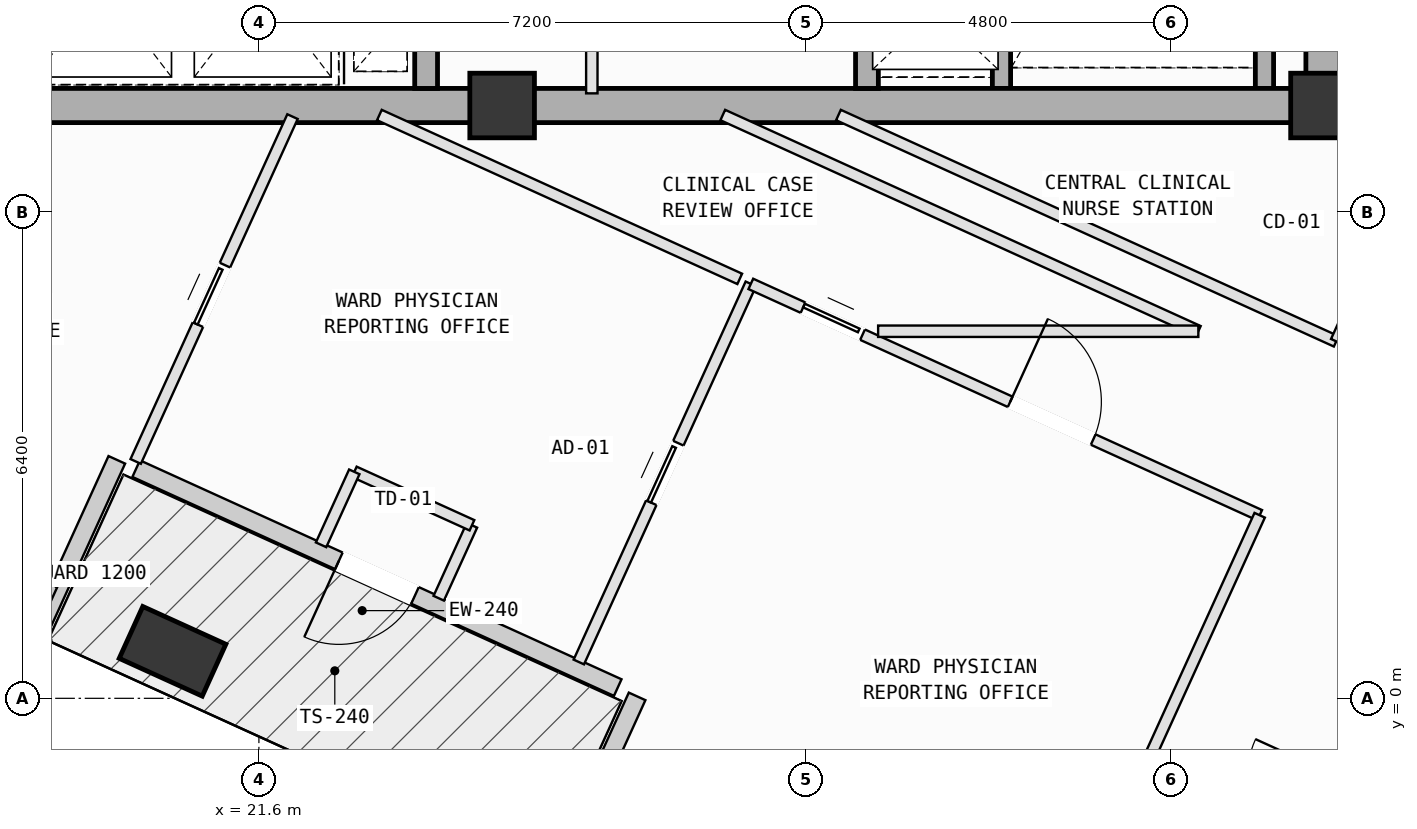
"""IFC4 building model, lengths in metres.
Left out: names, types, materials, properties, quantities, classifications, styles, units other than length and angle.
Written with IfcOpenShell. Run it as: python <this file> out.ifc"""

import sys

from ifc_helpers import new_model, si_unit, direction, frame, frame_2d, origin, origin_2d, place, context, subcontext, project, spatial, rectangle, extrude, element, fill, save


model = new_model("IFC4")
c1 = context("Model", 3, precision=1e-05, world=origin(), true_north=direction((0.0, 1.0)))
c2 = subcontext(c1, "Body", "Model", "MODEL_VIEW")
j1 = project(units=[si_unit("LENGTHUNIT", "METRE"), si_unit("PLANEANGLEUNIT", "RADIAN")], contexts=[c1])
p1 = place(None, origin())
s1 = spatial("IfcSite", under=j1, at=p1, CompositionType="ELEMENT")
p2 = place(p1, origin())
s2 = spatial("IfcBuilding", under=s1, at=p2, CompositionType="ELEMENT")
p3 = place(p2, frame((0.0, 0.0, 304.6)))
s3 = spatial("IfcBuildingStorey", under=s2, at=p3, CompositionType="ELEMENT", Elevation=304.6)
for number, where, z_axis, x_axis in (
    (1, (24.8, 7.8, 0.0), (0.0, 0.0, 1.0), (1.0, 0.0, 0.0)),
    (2, (35.6, 7.8, 0.0), (0.0, 0.0, 1.0), (1.0, 0.0, 0.0)),
):
    element("IfcColumn", number, at=place(p3, frame(where, z_axis=z_axis, x_axis=x_axis)), inside=s3, PredefinedType="COLUMN", context=c2, shape_type="SweptSolid", body=[
        extrude(rectangle(XDim=0.85, YDim=0.85, at=origin_2d()), origin(), (0.0, 0.0, 1.0), 4.0),
    ])
p4 = place(p3, frame((20.464, 0.619, 0.002), z_axis=(0.100016423417, -0.053280353956, 0.993558211143), x_axis=(-0.790946445889, -0.61008500416, 0.046904236858)))
e3 = element("IfcColumn", 3, at=p4, inside=s3, PredefinedType="COLUMN", context=c2, shape_type="SweptSolid", body=[
    extrude(rectangle(XDim=1.2, YDim=0.75, at=origin_2d()), origin(), (0.0, 0.0, 1.0), 3.954),
])
p5 = place(p3, frame((26.321, 0.141, 0.0), z_axis=(0.0, 0.0, 1.0), x_axis=(-0.910318420634, 0.413908653032, 0.0)))
e4 = element("IfcWall", 4, at=p5, inside=s3, PredefinedType="SOLIDWALL", context=c2, shape_type="SweptSolid", body=[
    extrude(rectangle(XDim=6.96, YDim=0.24, at=frame_2d((3.48, 0.0))), origin(), (0.0, 0.0, 1.0), 3.265),
])
p6 = place(p5, frame((2.93, 0.0, 0.0)))
e5 = element("IfcOpeningElement", 5, at=p6, cuts=e4, PredefinedType="OPENING", context=c2, shape_type="SweptSolid", body=[
    extrude(rectangle(XDim=1.1, YDim=2.15, at=frame_2d((0.55, 1.075))), frame((0.0, 0.13, 0.0), z_axis=(0.0, -1.0, 0.0), x_axis=(1.0, 0.0, 0.0)), (0.0, 0.0, 1.0), 0.26),
])
p7 = place(p3, frame((25.541, -2.25, 0.0), z_axis=(0.0, 0.0, 1.0), x_axis=(0.413898598891, 0.91032299204, 0.0)))
e6 = element("IfcWall", 6, at=p7, inside=s3, PredefinedType="SOLIDWALL", context=c2, shape_type="SweptSolid", body=[
    extrude(rectangle(XDim=2.5, YDim=0.24, at=frame_2d((1.25, 0.0))), origin(), (0.0, 0.0, 1.0), 3.265),
])
p8 = place(p3, frame((19.73, 3.138, 0.0), z_axis=(0.0, 0.0, 1.0), x_axis=(-0.413942727545, -0.910302926675, 0.0)))
e7 = element("IfcWall", 7, at=p8, inside=s3, PredefinedType="SOLIDWALL", context=c2, shape_type="SweptSolid", body=[
    extrude(rectangle(XDim=2.5, YDim=0.24, at=frame_2d((1.25, 0.0))), origin(), (0.0, 0.0, 1.0), 3.265),
])
p9 = place(p3, frame((18.888, 1.335, 0.0), z_axis=(0.0, 0.0, 1.0), x_axis=(-0.910315921542, 0.413914149296, 0.0)))
e8 = element("IfcWall", 8, at=p9, inside=s3, PredefinedType="SOLIDWALL", context=c2, shape_type="SweptSolid", body=[
    extrude(rectangle(XDim=4.301, YDim=0.28, at=frame_2d((2.15, 0.0))), origin(), (0.0, 0.0, 1.0), 3.245),
])
p10 = place(p9, frame((1.374, 0.0, 0.75)))
e9 = element("IfcOpeningElement", 9, at=p10, cuts=e8, PredefinedType="OPENING", context=c2, shape_type="SweptSolid", body=[
    extrude(rectangle(XDim=1.4, YDim=1.85, at=frame_2d((0.7, 0.925))), frame((0.0, 0.15, 0.0), z_axis=(0.0, -1.0, 0.0), x_axis=(1.0, 0.0, 0.0)), (0.0, 0.0, 1.0), 0.3),
])
for number, where, z_axis, x_axis in (
    (10, (34.83, 15.12, 0.0), (0.0, 0.0, 1.0), (0.0, -1.0, 0.0)),
    (11, (31.37, 8.025, 0.0), (0.0, 0.0, 1.0), (0.0, 1.0, 0.0)),
):
    element("IfcWall", number, at=place(p3, frame(where, z_axis=z_axis, x_axis=x_axis)), inside=s3, PredefinedType="SOLIDWALL", context=c2, shape_type="SweptSolid", body=[
        extrude(rectangle(XDim=7.095, YDim=0.24, at=frame_2d((3.548, 0.0))), origin(), (0.0, 0.0, 1.0), 3.78),
    ])
for number, where, z_axis, x_axis in (
    (12, (14.0, 7.8, 0.0), (0.0, 0.0, 1.0), (1.0, 0.0, 0.0)),
    (13, (24.8, 7.8, 0.0), (0.0, 0.0, 1.0), (1.0, 0.0, 0.0)),
):
    element("IfcWall", number, at=place(p3, frame(where, z_axis=z_axis, x_axis=x_axis)), inside=s3, PredefinedType="SHEAR", context=c2, shape_type="SweptSolid", body=[
        extrude(rectangle(XDim=10.8, YDim=0.45, at=frame_2d((5.4, 0.0))), origin(), (0.0, 0.0, 1.0), 3.78),
    ])
p11 = place(p3, frame((35.6, 7.8, 0.0), z_axis=(0.0, 0.0, 1.0), x_axis=(0.0, 1.0, 0.0)))
e14 = element("IfcWall", 14, at=p11, inside=s3, PredefinedType="SHEAR", context=c2, shape_type="SweptSolid", body=[
    extrude(rectangle(XDim=9.0, YDim=0.45, at=frame_2d((4.5, 0.0))), origin(), (0.0, 0.0, 1.0), 3.78),
])
p12 = place(p3, frame((23.8, 8.025, 0.0), z_axis=(0.0, 0.0, 1.0), x_axis=(0.0, 1.0, 0.0)))
e15 = element("IfcWall", 15, at=p12, inside=s3, PredefinedType="SOLIDWALL", context=c2, shape_type="SweptSolid", body=[
    extrude(rectangle(XDim=2.655, YDim=0.3, at=frame_2d((1.328, 0.0))), origin(), (0.0, 0.0, 1.0), 3.78),
])
p13 = place(p3, frame((29.6, 8.025, 0.0), z_axis=(0.0, 0.0, 1.0), x_axis=(0.0, 1.0, 0.0)))
e16 = element("IfcWall", 16, at=p13, inside=s3, PredefinedType="SOLIDWALL", context=c2, shape_type="SweptSolid", body=[
    extrude(rectangle(XDim=1.995, YDim=0.3, at=frame_2d((0.998, 0.0))), origin(), (0.0, 0.0, 1.0), 3.78),
])
p14 = place(p3, frame((25.98, 7.96, 0.0), z_axis=(0.0, 0.0, 1.0), x_axis=(0.0, 1.0, 0.0)))
e17 = element("IfcWall", 17, at=p14, inside=s3, PredefinedType="PARTITIONING", context=c2, shape_type="SweptSolid", body=[
    extrude(rectangle(XDim=2.54, YDim=0.15, at=frame_2d((1.27, 0.0))), origin(), (0.0, 0.0, 1.0), 3.78),
])
p15 = place(p14, frame((0.945, 0.0, 0.0)))
e18 = element("IfcOpeningElement", 18, at=p15, cuts=e17, PredefinedType="OPENING", context=c2, shape_type="SweptSolid", body=[
    extrude(rectangle(XDim=1.0, YDim=2.12, at=frame_2d((0.5, 1.06))), frame((0.0, 0.085, 0.0), z_axis=(0.0, -1.0, 0.0), x_axis=(1.0, 0.0, 0.0)), (0.0, 0.0, 1.0), 0.17),
])
p16 = place(p3, frame((33.851, -5.331, 0.0), z_axis=(0.0, 0.0, 1.0), x_axis=(0.413939108793, 0.910304572224, 0.0)))
e19 = element("IfcWall", 19, at=p16, inside=s3, PredefinedType="PARTITIONING", context=c2, shape_type="SweptSolid", body=[
    extrude(rectangle(XDim=8.24, YDim=0.15, at=frame_2d((4.12, 0.0))), origin(), (0.0, 0.0, 1.0), 3.78),
])
p17 = place(p16, frame((3.52, 0.0, 0.0)))
e20 = element("IfcOpeningElement", 20, at=p17, cuts=e19, PredefinedType="OPENING", context=c2, shape_type="SweptSolid", body=[
    extrude(rectangle(XDim=1.2, YDim=2.15, at=frame_2d((0.6, 1.075))), frame((0.0, 0.085, 0.0), z_axis=(0.0, -1.0, 0.0), x_axis=(1.0, 0.0, 0.0)), (0.0, 0.0, 1.0), 0.17),
])
p18 = place(p3, frame((25.809, 0.478, 0.0), z_axis=(0.0, 0.0, 1.0), x_axis=(0.414051982824, 0.910253237028, 0.0)))
e21 = element("IfcWall", 21, at=p18, inside=s3, PredefinedType="PARTITIONING", context=c2, shape_type="SweptSolid", body=[
    extrude(rectangle(XDim=5.465, YDim=0.15, at=frame_2d((2.733, 0.0))), origin(), (0.0, 0.0, 1.0), 3.78),
])
p19 = place(p18, frame((2.303, 0.0, 0.0)))
e22 = element("IfcOpeningElement", 22, at=p19, cuts=e21, PredefinedType="OPENING", context=c2, shape_type="SweptSolid", body=[
    extrude(rectangle(XDim=0.86, YDim=2.06, at=frame_2d((0.43, 1.03))), frame((0.0, 0.085, 0.0), z_axis=(0.0, -1.0, 0.0), x_axis=(1.0, 0.0, 0.0)), (0.0, 0.0, 1.0), 0.17),
])
p20 = place(p3, frame((28.072, 5.453, 0.0), z_axis=(0.0, 0.0, 1.0), x_axis=(0.910328957898, -0.413885477412, 0.0)))
e23 = element("IfcWall", 23, at=p20, inside=s3, PredefinedType="PARTITIONING", context=c2, shape_type="SweptSolid", body=[
    extrude(rectangle(XDim=7.354, YDim=0.15, at=frame_2d((3.677, 0.0))), origin(), (0.0, 0.0, 1.0), 3.78),
])
p21 = place(p20, frame((3.749, 0.0, 0.0)))
e24 = element("IfcOpeningElement", 24, at=p21, cuts=e23, PredefinedType="OPENING", context=c2, shape_type="SweptSolid", body=[
    extrude(rectangle(XDim=1.2, YDim=2.15, at=frame_2d((0.6, 1.075))), frame((0.0, 0.085, 0.0), z_axis=(0.0, -1.0, 0.0), x_axis=(1.0, 0.0, 0.0)), (0.0, 0.0, 1.0), 0.17),
])
p22 = place(p20, frame((0.755, 0.0, 0.0)))
e25 = element("IfcOpeningElement", 25, at=p22, cuts=e23, PredefinedType="OPENING", context=c2, shape_type="SweptSolid", body=[
    extrude(rectangle(XDim=0.86, YDim=2.06, at=frame_2d((0.43, 1.03))), frame((0.0, 0.085, 0.0), z_axis=(0.0, -1.0, 0.0), x_axis=(1.0, 0.0, 0.0)), (0.0, 0.0, 1.0), 0.17),
])
p23 = place(p3, frame((34.767, 2.409, 0.0), z_axis=(0.0, 0.0, 1.0), x_axis=(-0.413855914094, -0.910342398425, 0.0)))
e26 = element("IfcWall", 26, at=p23, inside=s3, PredefinedType="PARTITIONING", context=c2, shape_type="SweptSolid", body=[
    extrude(rectangle(XDim=5.903, YDim=0.15, at=frame_2d((2.952, 0.0))), origin(), (0.0, 0.0, 1.0), 3.78),
])
p24 = place(p3, frame((23.966, 1.317, 0.0), z_axis=(0.0, 0.0, 1.0), x_axis=(0.414238787533, 0.910168240988, 0.0)))
e27 = element("IfcWall", 27, at=p24, inside=s3, PredefinedType="PARTITIONING", context=c2, shape_type="SweptSolid", body=[
    extrude(rectangle(XDim=1.055, YDim=0.15, at=frame_2d((0.527, 0.0))), origin(), (0.0, 0.0, 1.0), 3.78),
])
p25 = place(p3, frame((24.403, 2.277, 0.0), z_axis=(0.0, 0.0, 1.0), x_axis=(-0.910543430544, 0.413413426358, 0.0)))
e28 = element("IfcWall", 28, at=p25, inside=s3, PredefinedType="PARTITIONING", context=c2, shape_type="SweptSolid", body=[
    extrude(rectangle(XDim=1.7, YDim=0.15, at=frame_2d((0.85, 0.0))), origin(), (0.0, 0.0, 1.0), 3.78),
])
p26 = place(p3, frame((22.855, 2.98, 0.0), z_axis=(0.0, 0.0, 1.0), x_axis=(-0.414326054961, -0.910128518496, 0.0)))
e29 = element("IfcWall", 29, at=p26, inside=s3, PredefinedType="PARTITIONING", context=c2, shape_type="SweptSolid", body=[
    extrude(rectangle(XDim=1.055, YDim=0.15, at=frame_2d((0.527, 0.0))), origin(), (0.0, 0.0, 1.0), 3.78),
])
p27 = place(p3, frame((19.979, 3.117, 0.0), z_axis=(0.0, 0.0, 1.0), x_axis=(0.413913658196, 0.910316144841, 0.0)))
e30 = element("IfcWall", 30, at=p27, inside=s3, PredefinedType="PARTITIONING", context=c2, shape_type="SweptSolid", body=[
    extrude(rectangle(XDim=4.984, YDim=0.15, at=frame_2d((2.492, 0.0))), origin(), (0.0, 0.0, 1.0), 3.78),
])
p28 = place(p27, frame((1.977, 0.0, 0.0)))
e31 = element("IfcOpeningElement", 31, at=p28, cuts=e30, PredefinedType="OPENING", context=c2, shape_type="SweptSolid", body=[
    extrude(rectangle(XDim=0.86, YDim=2.06, at=frame_2d((0.43, 1.03))), frame((0.0, 0.085, 0.0), z_axis=(0.0, -1.0, 0.0), x_axis=(1.0, 0.0, 0.0)), (0.0, 0.0, 1.0), 0.17),
])
p29 = place(p3, frame((23.185, 7.675, 0.0), z_axis=(0.0, 0.0, 1.0), x_axis=(0.910292616599, -0.413965399721, 0.0)))
e32 = element("IfcWall", 32, at=p29, inside=s3, PredefinedType="PARTITIONING", context=c2, shape_type="SweptSolid", body=[
    extrude(rectangle(XDim=5.208, YDim=0.15, at=frame_2d((2.604, 0.0))), origin(), (0.0, 0.0, 1.0), 3.78),
])
p30 = place(p3, frame((35.774, 4.697, 0.0), z_axis=(0.0, 0.0, 1.0), x_axis=(-0.910299058276, 0.413951234449, 0.0)))
e33 = element("IfcWall", 33, at=p30, inside=s3, PredefinedType="PARTITIONING", context=c2, shape_type="SweptSolid", body=[
    extrude(rectangle(XDim=7.194, YDim=0.15, at=frame_2d((3.597, 0.0))), origin(), (0.0, 0.0, 1.0), 3.78),
])
p31 = place(p3, frame((35.6, 7.5, 0.0), z_axis=(0.0, 0.0, 1.0), x_axis=(1.0, 0.0, 0.0)))
e34 = element("IfcWall", 34, at=p31, inside=s3, PredefinedType="PARTITIONING", context=c2, shape_type="SweptSolid", body=[
    extrude(rectangle(XDim=0.55, YDim=0.15, at=frame_2d((0.275, 0.0))), origin(), (0.0, 0.0, 1.0), 2.765),
])
p32 = place(p3, frame((37.15, 7.723, 0.0), z_axis=(0.0, 0.0, 1.0), x_axis=(-0.413946814598, -0.910301068155, 0.0)))
e35 = element("IfcWall", 35, at=p32, inside=s3, PredefinedType="PARTITIONING", context=c2, shape_type="SweptSolid", body=[
    extrude(rectangle(XDim=3.324, YDim=0.15, at=frame_2d((1.662, 0.0))), origin(), (0.0, 0.0, 1.0), 3.78),
])
p33 = place(p32, frame((1.479, 0.0, 0.0)))
e36 = element("IfcOpeningElement", 36, at=p33, cuts=e35, PredefinedType="OPENING", context=c2, shape_type="SweptSolid", body=[
    extrude(rectangle(XDim=1.0, YDim=2.12, at=frame_2d((0.5, 1.06))), frame((0.0, 0.085, 0.0), z_axis=(0.0, -1.0, 0.0), x_axis=(1.0, 0.0, 0.0)), (0.0, 0.0, 1.0), 0.17),
])
p34 = place(p3, frame((27.703, 7.675, 0.0), z_axis=(0.0, 0.0, 1.0), x_axis=(0.910320248234, -0.413904633527, 0.0)))
e37 = element("IfcWall", 37, at=p34, inside=s3, PredefinedType="PARTITIONING", context=c2, shape_type="SweptSolid", body=[
    extrude(rectangle(XDim=6.874, YDim=0.15, at=frame_2d((3.437, 0.0))), origin(), (0.0, 0.0, 1.0), 3.78),
])
p35 = place(p3, frame((33.96, 4.83, 0.0), z_axis=(0.0, 0.0, 1.0), x_axis=(-1.0, 0.0, 0.0)))
e38 = element("IfcWall", 38, at=p35, inside=s3, PredefinedType="PARTITIONING", context=c2, shape_type="SweptSolid", body=[
    extrude(rectangle(XDim=4.213, YDim=0.15, at=frame_2d((2.106, 0.0))), origin(), (0.0, 0.0, 1.0), 3.78),
])
p36 = place(p6, origin())
e39 = element("IfcDoor", 39, at=p36, inside=s3, OperationType="SINGLE_SWING_RIGHT", PredefinedType="DOOR", context=c2, shape_type="SweptSolid", body=[
    extrude(rectangle(XDim=1.1, YDim=2.15, at=frame_2d((0.55, 1.075))), frame((0.0, 0.025, 0.0), z_axis=(0.0, -1.0, 0.0), x_axis=(1.0, 0.0, 0.0)), (0.0, 0.0, 1.0), 0.05),
])
fill(e5, e39)
p37 = place(p21, origin())
e40 = element("IfcDoor", 40, at=p37, inside=s3, OperationType="SINGLE_SWING_LEFT", PredefinedType="DOOR", context=c2, shape_type="SweptSolid", body=[
    extrude(rectangle(XDim=1.2, YDim=2.15, at=frame_2d((0.6, 1.075))), frame((0.0, 0.025, 0.0), z_axis=(0.0, -1.0, 0.0), x_axis=(1.0, 0.0, 0.0)), (0.0, 0.0, 1.0), 0.05),
])
fill(e24, e40)
p38 = place(p19, origin())
e41 = element("IfcDoor", 41, at=p38, inside=s3, OperationType="SLIDING_TO_LEFT", PredefinedType="DOOR", context=c2, shape_type="SweptSolid", body=[
    extrude(rectangle(XDim=0.86, YDim=2.06, at=frame_2d((0.43, 1.03))), frame((0.0, 0.025, 0.0), z_axis=(0.0, -1.0, 0.0), x_axis=(1.0, 0.0, 0.0)), (0.0, 0.0, 1.0), 0.05),
])
fill(e22, e41)
p39 = place(p22, origin())
e42 = element("IfcDoor", 42, at=p39, inside=s3, OperationType="SLIDING_TO_LEFT", PredefinedType="DOOR", context=c2, shape_type="SweptSolid", body=[
    extrude(rectangle(XDim=0.86, YDim=2.06, at=frame_2d((0.43, 1.03))), frame((0.0, 0.025, 0.0), z_axis=(0.0, -1.0, 0.0), x_axis=(1.0, 0.0, 0.0)), (0.0, 0.0, 1.0), 0.05),
])
fill(e25, e42)
p40 = place(p28, origin())
e43 = element("IfcDoor", 43, at=p40, inside=s3, OperationType="SLIDING_TO_LEFT", PredefinedType="DOOR", context=c2, shape_type="SweptSolid", body=[
    extrude(rectangle(XDim=0.86, YDim=2.06, at=frame_2d((0.43, 1.03))), frame((0.0, 0.025, 0.0), z_axis=(0.0, -1.0, 0.0), x_axis=(1.0, 0.0, 0.0)), (0.0, 0.0, 1.0), 0.05),
])
fill(e31, e43)
save(model, sys.argv[1])
